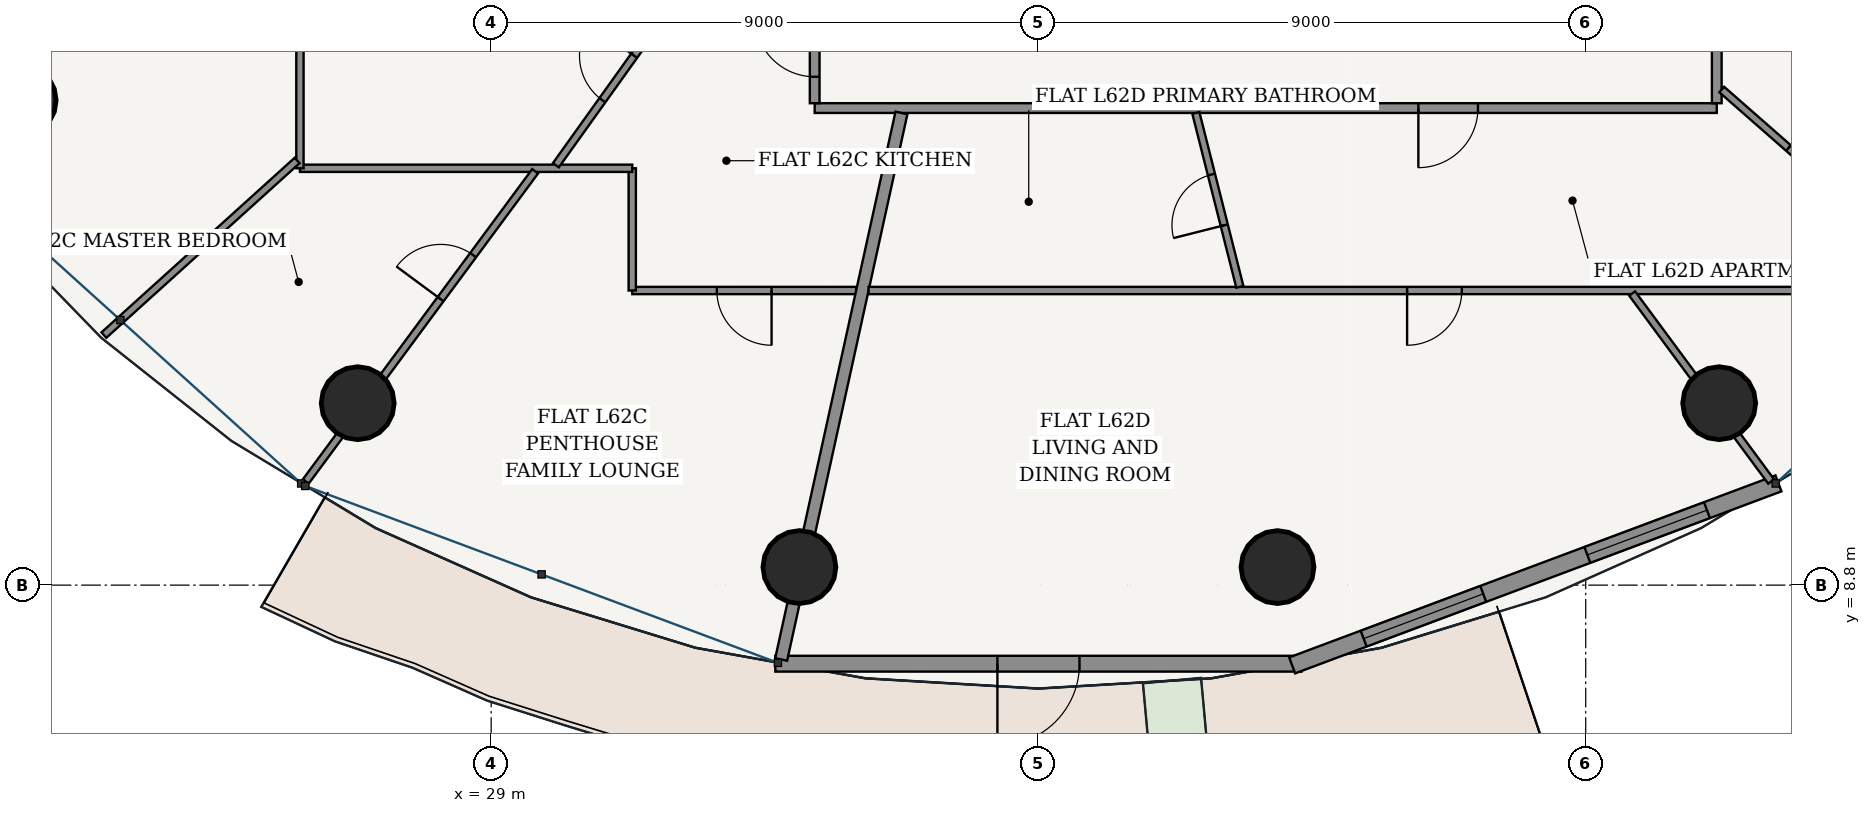
"""IFC4 building model, lengths in metres.
Left out: names, types, materials, properties, quantities, classifications, styles, units other than length and angle.
Written with IfcOpenShell. Run it as: python <this file> out.ifc"""

import sys

from ifc_helpers import new_model, si_unit, direction, frame, frame_2d, origin, origin_2d, place, context, subcontext, project, spatial, rectangle, hollow_circle, extrude, source, transform, mapped, element, fill, save


model = new_model("IFC4")
c1 = context("Model", 3, precision=1e-05, world=origin(), true_north=direction((-0.2419218956, 0.970295726276)))
c2 = subcontext(c1, "Body", "Model", "MODEL_VIEW")
j1 = project(units=[si_unit("LENGTHUNIT", "METRE"), si_unit("PLANEANGLEUNIT", "RADIAN")], contexts=[c1])
p1 = place(None, origin())
s1 = spatial("IfcSite", under=j1, at=p1, CompositionType="ELEMENT")
p2 = place(p1, origin())
s2 = spatial("IfcBuilding", under=s1, at=p2, CompositionType="ELEMENT")
p3 = place(p2, frame((0.0, 0.0, 235.6)))
s3 = spatial("IfcBuildingStorey", under=s2, at=p3, CompositionType="ELEMENT", Elevation=235.6)
for number, where, z_axis, x_axis in (
    (1, (21.246, 16.772, 0.0), (0.0, 0.0, 1.0), (1.0, 0.0, 0.0)),
    (2, (26.805, 11.792, 0.0), (0.0, 0.0, 1.0), (1.0, 0.0, 0.0)),
    (3, (34.069, 9.097, 0.0), (0.0, 0.0, 1.0), (1.0, 0.0, 0.0)),
    (4, (41.931, 9.097, 0.0), (0.0, 0.0, 1.0), (1.0, 0.0, 0.0)),
    (5, (49.195, 11.792, 0.0), (0.0, 0.0, 1.0), (1.0, 0.0, 0.0)),
):
    element("IfcColumn", number, at=place(p3, frame(where, z_axis=z_axis, x_axis=x_axis)), inside=s3, PredefinedType="COLUMN", context=c2, shape_type="SweptSolid", body=[
        extrude(hollow_circle(Radius=0.6, WallThickness=0.038, at=origin_2d()), origin(), (0.0, 0.0, 1.0), 3.7),
    ])
p4 = place(p3, frame((33.673, 7.508, 0.0), z_axis=(0.0, 0.0, 1.0), x_axis=(1.0, 0.0, 0.0)))
e6 = element("IfcWall", 6, at=p4, inside=s3, PredefinedType="SOLIDWALL", context=c2, shape_type="SweptSolid", body=[
    extrude(rectangle(XDim=8.654, YDim=0.26, at=frame_2d((4.327, 0.0))), origin(), (0.0, 0.0, 1.0), 3.435),
])
p5 = place(p4, frame((3.652, 0.0, 0.0)))
e7 = element("IfcOpeningElement", 7, at=p5, cuts=e6, PredefinedType="OPENING", context=c2, shape_type="SweptSolid", body=[
    extrude(rectangle(XDim=1.35, YDim=2.2, at=frame_2d((0.675, 1.1))), frame((0.0, 0.14, 0.0), z_axis=(0.0, -1.0, 0.0), x_axis=(1.0, 0.0, 0.0)), (0.0, 0.0, 1.0), 0.28),
])
p6 = place(p3, frame((42.172, 7.48, 0.0), z_axis=(0.0, 0.0, 1.0), x_axis=(0.936556918375, 0.350515532672, 0.0)))
e8 = element("IfcWall", 8, at=p6, inside=s3, PredefinedType="SOLIDWALL", context=c2, shape_type="SweptSolid", body=[
    extrude(rectangle(XDim=8.539, YDim=0.28, at=frame_2d((4.27, 0.0))), origin(), (0.0, 0.0, 1.0), 3.435),
])
p7 = place(p6, frame((1.256, 0.0, 0.85)))
e9 = element("IfcOpeningElement", 9, at=p7, cuts=e8, PredefinedType="OPENING", context=c2, shape_type="SweptSolid", body=[
    extrude(rectangle(XDim=2.1, YDim=1.95, at=frame_2d((1.05, 0.975))), frame((0.0, 0.15, 0.0), z_axis=(0.0, -1.0, 0.0), x_axis=(1.0, 0.0, 0.0)), (0.0, 0.0, 1.0), 0.3),
])
p8 = place(p6, frame((5.184, 0.0, 0.85)))
e10 = element("IfcOpeningElement", 10, at=p8, cuts=e8, PredefinedType="OPENING", context=c2, shape_type="SweptSolid", body=[
    extrude(rectangle(XDim=2.1, YDim=1.95, at=frame_2d((1.05, 0.975))), frame((0.0, 0.15, 0.0), z_axis=(0.0, -1.0, 0.0), x_axis=(1.0, 0.0, 0.0)), (0.0, 0.0, 1.0), 0.3),
])
p9 = place(p3, frame((34.32, 16.645, 0.0), z_axis=(0.0, 0.0, 1.0), x_axis=(1.0, 0.0, 0.0)))
e11 = element("IfcWall", 11, at=p9, inside=s3, PredefinedType="PARTITIONING", context=c2, shape_type="SweptSolid", body=[
    extrude(rectangle(XDim=14.835, YDim=0.16, at=frame_2d((7.417, 0.0))), origin(), (0.0, 0.0, 1.0), 2.951),
])
p10 = place(p9, frame((9.928, 0.0, 0.0)))
e12 = element("IfcOpeningElement", 12, at=p10, cuts=e11, PredefinedType="OPENING", context=c2, shape_type="SweptSolid", body=[
    extrude(rectangle(XDim=0.98, YDim=2.2, at=frame_2d((0.49, 1.1))), frame((0.0, 0.09, 0.0), z_axis=(0.0, -1.0, 0.0), x_axis=(1.0, 0.0, 0.0)), (0.0, 0.0, 1.0), 0.18),
])
p11 = place(p3, frame((34.32, 16.725, 0.0), z_axis=(0.0, 0.0, 1.0), x_axis=(0.0, 1.0, 0.0)))
e13 = element("IfcWall", 13, at=p11, inside=s3, PredefinedType="PARTITIONING", context=c2, shape_type="SweptSolid", body=[
    extrude(rectangle(XDim=1.85, YDim=0.16, at=frame_2d((0.925, 0.0))), origin(), (0.0, 0.0, 1.0), 3.435),
])
p12 = place(p11, frame((0.435, 0.0, 0.0)))
e14 = element("IfcOpeningElement", 14, at=p12, cuts=e13, PredefinedType="OPENING", context=c2, shape_type="SweptSolid", body=[
    extrude(rectangle(XDim=0.98, YDim=2.2, at=frame_2d((0.49, 1.1))), frame((0.0, 0.09, 0.0), z_axis=(0.0, -1.0, 0.0), x_axis=(1.0, 0.0, 0.0)), (0.0, 0.0, 1.0), 0.18),
])
p13 = place(p3, frame((49.155, 16.725, 0.0), z_axis=(0.0, 0.0, 1.0), x_axis=(0.0, 1.0, 0.0)))
e15 = element("IfcWall", 15, at=p13, inside=s3, PredefinedType="PARTITIONING", context=c2, shape_type="SweptSolid", body=[
    extrude(rectangle(XDim=18.3, YDim=0.16, at=frame_2d((9.15, 0.0))), origin(), (0.0, 0.0, 1.0), 2.951),
])
p14 = place(p13, frame((7.401, 0.0, 0.0)))
e16 = element("IfcOpeningElement", 16, at=p14, cuts=e15, PredefinedType="OPENING", context=c2, shape_type="SweptSolid", body=[
    extrude(rectangle(XDim=0.98, YDim=2.2, at=frame_2d((0.49, 1.1))), frame((0.0, 0.09, 0.0), z_axis=(0.0, -1.0, 0.0), x_axis=(1.0, 0.0, 0.0)), (0.0, 0.0, 1.0), 0.18),
])
p15 = place(p3, frame((35.002, 13.645, 0.0), z_axis=(0.0, 0.0, 1.0), x_axis=(-1.0, 0.0, 0.0)))
e17 = element("IfcWall", 17, at=p15, inside=s3, PredefinedType="PARTITIONING", context=c2, shape_type="SweptSolid", body=[
    extrude(rectangle(XDim=3.682, YDim=0.12, at=frame_2d((1.841, 0.0))), origin(), (0.0, 0.0, 1.0), 2.951),
])
p16 = place(p15, frame((1.391, 0.0, 0.0)))
e18 = element("IfcOpeningElement", 18, at=p16, cuts=e17, PredefinedType="OPENING", context=c2, shape_type="SweptSolid", body=[
    extrude(rectangle(XDim=0.9, YDim=2.15, at=frame_2d((0.45, 1.075))), frame((0.0, 0.07, 0.0), z_axis=(0.0, -1.0, 0.0), x_axis=(1.0, 0.0, 0.0)), (0.0, 0.0, 1.0), 0.14),
])
p17 = place(p3, frame((31.32, 13.645, 0.0), z_axis=(0.0, 0.0, 1.0), x_axis=(0.0, 1.0, 0.0)))
e19 = element("IfcWall", 19, at=p17, inside=s3, PredefinedType="PARTITIONING", context=c2, shape_type="SweptSolid", body=[
    extrude(rectangle(XDim=2.01, YDim=0.12, at=frame_2d((1.005, 0.0))), origin(), (0.0, 0.0, 1.0), 3.11),
])
p18 = place(p3, frame((31.32, 15.655, 0.0), z_axis=(0.0, 0.0, 1.0), x_axis=(-1.0, 0.0, 0.0)))
e20 = element("IfcWall", 20, at=p18, inside=s3, PredefinedType="PARTITIONING", context=c2, shape_type="SweptSolid", body=[
    extrude(rectangle(XDim=5.465, YDim=0.12, at=frame_2d((2.732, 0.0))), origin(), (0.0, 0.0, 1.0), 2.951),
])
p19 = place(p3, frame((25.855, 15.655, 0.0), z_axis=(0.0, 0.0, 1.0), x_axis=(0.0, 1.0, 0.0)))
e21 = element("IfcWall", 21, at=p19, inside=s3, PredefinedType="PARTITIONING", context=c2, shape_type="SweptSolid", body=[
    extrude(rectangle(XDim=5.665, YDim=0.12, at=frame_2d((2.833, 0.0))), origin(), (0.0, 0.0, 1.0), 2.951),
])
p20 = place(p19, frame((2.383, 0.0, 0.0)))
e22 = element("IfcOpeningElement", 22, at=p20, cuts=e21, PredefinedType="OPENING", context=c2, shape_type="SweptSolid", body=[
    extrude(rectangle(XDim=0.9, YDim=2.15, at=frame_2d((0.45, 1.075))), frame((0.0, 0.07, 0.0), z_axis=(0.0, -1.0, 0.0), x_axis=(1.0, 0.0, 0.0)), (0.0, 0.0, 1.0), 0.14),
])
p21 = place(p3, frame((25.809, 15.783, 0.0), z_axis=(0.0, 0.0, 1.0), x_axis=(-0.741938009522, -0.670468485483, 0.0)))
e23 = element("IfcWall", 23, at=p21, inside=s3, PredefinedType="PARTITIONING", context=c2, shape_type="SweptSolid", body=[
    extrude(rectangle(XDim=4.284, YDim=0.12, at=frame_2d((2.142, 0.0))), origin(), (0.0, 0.0, 1.0), 2.951),
])
p22 = place(p3, frame((29.722, 15.605, 0.0), z_axis=(0.0, 0.0, 1.0), x_axis=(-0.594518724985, -0.80408176552, 0.0)))
e24 = element("IfcWall", 24, at=p22, inside=s3, PredefinedType="PARTITIONING", context=c2, shape_type="SweptSolid", body=[
    extrude(rectangle(XDim=6.344, YDim=0.12, at=frame_2d((3.172, 0.0))), origin(), (0.0, 0.0, 1.0), 2.951),
])
p23 = place(p22, frame((1.714, 0.0, 0.0)))
e25 = element("IfcOpeningElement", 25, at=p23, cuts=e24, PredefinedType="OPENING", context=c2, shape_type="SweptSolid", body=[
    extrude(rectangle(XDim=0.9, YDim=2.15, at=frame_2d((0.45, 1.075))), frame((0.0, 0.07, 0.0), z_axis=(0.0, -1.0, 0.0), x_axis=(1.0, 0.0, 0.0)), (0.0, 0.0, 1.0), 0.14),
])
p24 = place(p3, frame((32.117, 18.575, 0.0), z_axis=(0.0, 0.0, 1.0), x_axis=(-0.581800974427, -0.81333119094, 0.0)))
e26 = element("IfcWall", 26, at=p24, inside=s3, PredefinedType="PARTITIONING", context=c2, shape_type="SweptSolid", body=[
    extrude(rectangle(XDim=3.528, YDim=0.12, at=frame_2d((1.764, 0.0))), origin(), (0.0, 0.0, 1.0), 3.435),
])
p25 = place(p24, frame((1.314, 0.0, 0.0)))
e27 = element("IfcOpeningElement", 27, at=p25, cuts=e26, PredefinedType="OPENING", context=c2, shape_type="SweptSolid", body=[
    extrude(rectangle(XDim=0.9, YDim=2.15, at=frame_2d((0.45, 1.075))), frame((0.0, 0.07, 0.0), z_axis=(0.0, -1.0, 0.0), x_axis=(1.0, 0.0, 0.0)), (0.0, 0.0, 1.0), 0.14),
])
p26 = place(p3, frame((35.747, 16.565, 0.0), z_axis=(0.0, 0.0, 1.0), x_axis=(-0.214957946814, -0.976623305631, 0.0)))
e28 = element("IfcWall", 28, at=p26, inside=s3, PredefinedType="PARTITIONING", context=c2, shape_type="SweptSolid", body=[
    extrude(rectangle(XDim=9.202, YDim=0.2, at=frame_2d((4.601, 0.0))), origin(), (0.0, 0.0, 1.0), 2.951),
])
p27 = place(p3, frame((52.155, 13.645, 0.0), z_axis=(0.0, 0.0, 1.0), x_axis=(-1.0, 0.0, 0.0)))
e29 = element("IfcWall", 29, at=p27, inside=s3, PredefinedType="PARTITIONING", context=c2, shape_type="SweptSolid", body=[
    extrude(rectangle(XDim=16.949, YDim=0.12, at=frame_2d((8.474, 0.0))), origin(), (0.0, 0.0, 1.0), 2.951),
])
p28 = place(p27, frame((7.192, 0.0, 0.0)))
e30 = element("IfcOpeningElement", 30, at=p28, cuts=e29, PredefinedType="OPENING", context=c2, shape_type="SweptSolid", body=[
    extrude(rectangle(XDim=0.9, YDim=2.15, at=frame_2d((0.45, 1.075))), frame((0.0, 0.07, 0.0), z_axis=(0.0, -1.0, 0.0), x_axis=(1.0, 0.0, 0.0)), (0.0, 0.0, 1.0), 0.14),
])
p29 = place(p3, frame((47.764, 13.595, 0.0), z_axis=(0.0, 0.0, 1.0), x_axis=(0.594530312724, -0.804073197696, 0.0)))
e31 = element("IfcWall", 31, at=p29, inside=s3, PredefinedType="PARTITIONING", context=c2, shape_type="SweptSolid", body=[
    extrude(rectangle(XDim=3.845, YDim=0.12, at=frame_2d((1.922, 0.0))), origin(), (0.0, 0.0, 1.0), 2.951),
])
p30 = place(p3, frame((40.589, 16.565, 0.0), z_axis=(0.0, 0.0, 1.0), x_axis=(0.245222005641, -0.969466950416, 0.0)))
e32 = element("IfcWall", 32, at=p30, inside=s3, PredefinedType="PARTITIONING", context=c2, shape_type="SweptSolid", body=[
    extrude(rectangle(XDim=2.95, YDim=0.12, at=frame_2d((1.475, 0.0))), origin(), (0.0, 0.0, 1.0), 3.11),
])
p31 = place(p30, frame((1.045, 0.0, 0.0)))
e33 = element("IfcOpeningElement", 33, at=p31, cuts=e32, PredefinedType="OPENING", context=c2, shape_type="SweptSolid", body=[
    extrude(rectangle(XDim=0.86, YDim=2.15, at=frame_2d((0.43, 1.075))), frame((0.0, 0.07, 0.0), z_axis=(0.0, -1.0, 0.0), x_axis=(1.0, 0.0, 0.0)), (0.0, 0.0, 1.0), 0.14),
])
p32 = place(p3, frame((49.237, 16.95, 0.0), z_axis=(0.0, 0.0, 1.0), x_axis=(0.751994252696, -0.659169662463, 0.0)))
e34 = element("IfcWall", 34, at=p32, inside=s3, PredefinedType="PARTITIONING", context=c2, shape_type="SweptSolid", body=[
    extrude(rectangle(XDim=3.819, YDim=0.12, at=frame_2d((1.909, 0.0))), origin(), (0.0, 0.0, 1.0), 2.951),
])
p33 = place(p32, frame((1.459, 0.0, 0.0)))
e35 = element("IfcOpeningElement", 35, at=p33, cuts=e34, PredefinedType="OPENING", context=c2, shape_type="SweptSolid", body=[
    extrude(rectangle(XDim=0.9, YDim=2.15, at=frame_2d((0.45, 1.075))), frame((0.0, 0.07, 0.0), z_axis=(0.0, -1.0, 0.0), x_axis=(1.0, 0.0, 0.0)), (0.0, 0.0, 1.0), 0.14),
])
m1 = source(origin(), c2, "Body", "SweptSolid", [
    extrude(rectangle(XDim=1.35, YDim=2.2, at=frame_2d((0.675, 1.1))), frame((0.0, 0.025, 0.0), z_axis=(0.0, -1.0, 0.0), x_axis=(1.0, 0.0, 0.0)), (0.0, 0.0, 1.0), 0.05),
])
p34 = place(p5, frame((1.35, 0.0, 0.0), z_axis=(0.0, 0.0, 1.0), x_axis=(-1.0, 0.0, 0.0)))
e36 = element("IfcDoor", 36, at=p34, inside=s3, OperationType="SINGLE_SWING_RIGHT", PredefinedType="DOOR", context=c2, shape_type="MappedRepresentation", body=[
    mapped(m1, transform((0.0, 0.0, 0.0), scale=1.0)),
])
fill(e7, e36)
m2 = source(origin(), c2, "Body", "SweptSolid", [
    extrude(rectangle(XDim=2.1, YDim=1.95, at=frame_2d((1.05, 0.975))), frame((0.0, 0.03, 0.0), z_axis=(0.0, -1.0, 0.0), x_axis=(1.0, 0.0, 0.0)), (0.0, 0.0, 1.0), 0.06),
])
p35 = place(p7, origin())
e37 = element("IfcWindow", 37, at=p35, inside=s3, PartitioningType="SINGLE_PANEL", PredefinedType="WINDOW", context=c2, shape_type="MappedRepresentation", body=[
    mapped(m2, transform((0.0, 0.0, 0.0), scale=1.0)),
])
fill(e9, e37)
p36 = place(p8, origin())
e38 = element("IfcWindow", 38, at=p36, inside=s3, PartitioningType="SINGLE_PANEL", PredefinedType="WINDOW", context=c2, shape_type="MappedRepresentation", body=[
    mapped(m2, transform((0.0, 0.0, 0.0), scale=1.0)),
])
fill(e10, e38)
m3 = source(origin(), c2, "Body", "SweptSolid", [
    extrude(rectangle(XDim=0.98, YDim=2.2, at=frame_2d((0.49, 1.1))), frame((0.0, 0.025, 0.0), z_axis=(0.0, -1.0, 0.0), x_axis=(1.0, 0.0, 0.0)), (0.0, 0.0, 1.0), 0.05),
])
p37 = place(p12, origin())
e39 = element("IfcDoor", 39, at=p37, inside=s3, OperationType="SINGLE_SWING_RIGHT", PredefinedType="DOOR", context=c2, shape_type="MappedRepresentation", body=[
    mapped(m3, transform((0.0, 0.0, 0.0), scale=1.0)),
])
fill(e14, e39)
m4 = source(origin(), c2, "Body", "SweptSolid", [
    extrude(rectangle(XDim=0.9, YDim=2.15, at=frame_2d((0.45, 1.075))), frame((0.0, 0.025, 0.0), z_axis=(0.0, -1.0, 0.0), x_axis=(1.0, 0.0, 0.0)), (0.0, 0.0, 1.0), 0.05),
])
p38 = place(p16, origin())
e40 = element("IfcDoor", 40, at=p38, inside=s3, OperationType="SINGLE_SWING_LEFT", PredefinedType="DOOR", context=c2, shape_type="MappedRepresentation", body=[
    mapped(m4, transform((0.0, 0.0, 0.0), scale=1.0)),
])
fill(e18, e40)
p39 = place(p25, frame((0.9, 0.0, 0.0), z_axis=(0.0, 0.0, 1.0), x_axis=(-1.0, 0.0, 0.0)))
e41 = element("IfcDoor", 41, at=p39, inside=s3, OperationType="SINGLE_SWING_RIGHT", PredefinedType="DOOR", context=c2, shape_type="MappedRepresentation", body=[
    mapped(m4, transform((0.0, 0.0, 0.0), scale=1.0)),
])
fill(e27, e41)
p40 = place(p23, frame((0.9, 0.0, 0.0), z_axis=(0.0, 0.0, 1.0), x_axis=(-1.0, 0.0, 0.0)))
e42 = element("IfcDoor", 42, at=p40, inside=s3, OperationType="SINGLE_SWING_LEFT", PredefinedType="DOOR", context=c2, shape_type="MappedRepresentation", body=[
    mapped(m4, transform((0.0, 0.0, 0.0), scale=1.0)),
])
fill(e25, e42)
p41 = place(p10, frame((0.98, 0.0, 0.0), z_axis=(0.0, 0.0, 1.0), x_axis=(-1.0, 0.0, 0.0)))
e43 = element("IfcDoor", 43, at=p41, inside=s3, OperationType="SINGLE_SWING_RIGHT", PredefinedType="DOOR", context=c2, shape_type="MappedRepresentation", body=[
    mapped(m3, transform((0.0, 0.0, 0.0), scale=1.0)),
])
fill(e12, e43)
m5 = source(origin(), c2, "Body", "SweptSolid", [
    extrude(rectangle(XDim=0.86, YDim=2.15, at=frame_2d((0.43, 1.075))), frame((0.0, 0.025, 0.0), z_axis=(0.0, -1.0, 0.0), x_axis=(1.0, 0.0, 0.0)), (0.0, 0.0, 1.0), 0.05),
])
p42 = place(p31, frame((0.86, 0.0, 0.0), z_axis=(0.0, 0.0, 1.0), x_axis=(-1.0, 0.0, 0.0)))
e44 = element("IfcDoor", 44, at=p42, inside=s3, OperationType="SINGLE_SWING_LEFT", PredefinedType="DOOR", context=c2, shape_type="MappedRepresentation", body=[
    mapped(m5, transform((0.0, 0.0, 0.0), scale=1.0)),
])
fill(e33, e44)
p43 = place(p28, origin())
e45 = element("IfcDoor", 45, at=p43, inside=s3, OperationType="SINGLE_SWING_RIGHT", PredefinedType="DOOR", context=c2, shape_type="MappedRepresentation", body=[
    mapped(m4, transform((0.0, 0.0, 0.0), scale=1.0)),
])
fill(e30, e45)
p44 = place(p33, origin())
e46 = element("IfcDoor", 46, at=p44, inside=s3, OperationType="SINGLE_SWING_LEFT", PredefinedType="DOOR", context=c2, shape_type="MappedRepresentation", body=[
    mapped(m4, transform((0.0, 0.0, 0.0), scale=1.0)),
])
fill(e35, e46)
save(model, sys.argv[1])
